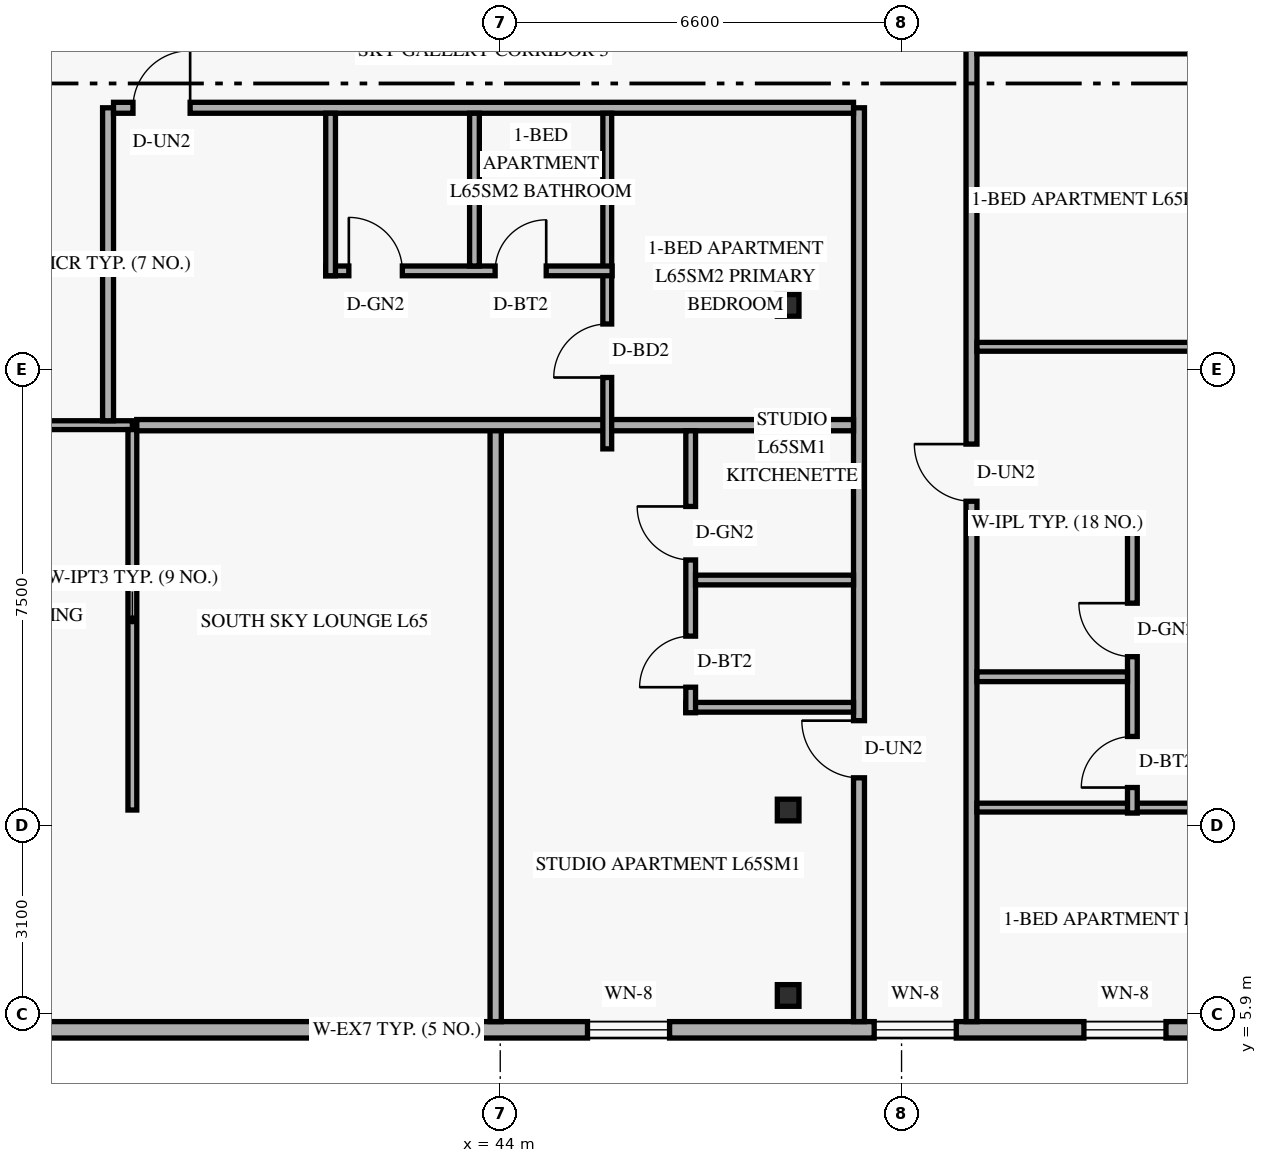
"""IFC4 building model, lengths in metres.
Left out: names, types, materials, properties, quantities, classifications, styles, units other than length and angle.
Written with IfcOpenShell. Run it as: python <this file> out.ifc"""

import sys

from ifc_helpers import new_model, si_unit, direction, frame, frame_2d, origin, origin_2d, place, context, subcontext, project, spatial, rectangle, hollow_rectangle, extrude, element, fill, save


model = new_model("IFC4")
c1 = context("Model", 3, precision=1e-05, world=origin(), true_north=direction((0.0, 1.0)))
c2 = subcontext(c1, "Body", "Model", "MODEL_VIEW")
j1 = project(units=[si_unit("LENGTHUNIT", "METRE"), si_unit("PLANEANGLEUNIT", "RADIAN")], contexts=[c1])
p1 = place(None, origin())
s1 = spatial("IfcSite", under=j1, at=p1, CompositionType="ELEMENT")
p2 = place(p1, origin())
s2 = spatial("IfcBuilding", under=s1, at=p2, CompositionType="ELEMENT")
p3 = place(p2, frame((0.0, 0.0, 249.6)))
s3 = spatial("IfcBuildingStorey", under=s2, at=p3, CompositionType="ELEMENT", Elevation=249.6)
for number, where, z_axis, x_axis in (
    (1, (48.672, 6.2, 0.0), (0.035, 0.0, 0.999), (0.0, 1.0, 0.0)),
    (2, (48.672, 9.25, 0.0), (0.035, 0.0, 0.999), (0.0, 1.0, 0.0)),
    (3, (48.672, 17.55, 0.0), (0.035, 0.0, 0.999), (0.0, 1.0, 0.0)),
):
    element("IfcColumn", number, at=place(p3, frame(where, z_axis=z_axis, x_axis=x_axis)), inside=s3, PredefinedType="COLUMN", context=c2, shape_type="SweptSolid", body=[
        extrude(hollow_rectangle(XDim=0.356, YDim=0.356, WallThickness=0.016, at=origin_2d()), origin(), (0.0, 0.0, 1.0), 3.602),
    ])
p4 = place(p3, frame((25.82, 5.635, 0.0), z_axis=(0.0, 0.0, 1.0), x_axis=(1.0, 0.0, 0.0)))
e4 = element("IfcWall", 4, at=p4, inside=s3, PredefinedType="SOLIDWALL", context=c2, shape_type="SweptSolid", body=[
    extrude(rectangle(XDim=32.96, YDim=0.27, at=frame_2d((16.48, 0.0))), origin(), (0.0, 0.0, 1.0), 3.36),
])
p5 = place(p4, frame((3.795, 0.0, 0.85)))
e5 = element("IfcOpeningElement", 5, at=p5, cuts=e4, PredefinedType="OPENING", context=c2, shape_type="SweptSolid", body=[
    extrude(rectangle(XDim=1.35, YDim=1.55, at=frame_2d((0.675, 0.775))), frame((0.0, 0.145, 0.0), z_axis=(0.0, -1.0, 0.0), x_axis=(1.0, 0.0, 0.0)), (0.0, 0.0, 1.0), 0.29),
])
p6 = place(p4, frame((19.615, 0.0, 0.85)))
e6 = element("IfcOpeningElement", 6, at=p6, cuts=e4, PredefinedType="OPENING", context=c2, shape_type="SweptSolid", body=[
    extrude(rectangle(XDim=1.35, YDim=1.55, at=frame_2d((0.675, 0.775))), frame((0.0, 0.145, 0.0), z_axis=(0.0, -1.0, 0.0), x_axis=(1.0, 0.0, 0.0)), (0.0, 0.0, 1.0), 0.29),
])
p7 = place(p4, frame((24.33, 0.0, 0.85)))
e7 = element("IfcOpeningElement", 7, at=p7, cuts=e4, PredefinedType="OPENING", context=c2, shape_type="SweptSolid", body=[
    extrude(rectangle(XDim=1.35, YDim=1.55, at=frame_2d((0.675, 0.775))), frame((0.0, 0.145, 0.0), z_axis=(0.0, -1.0, 0.0), x_axis=(1.0, 0.0, 0.0)), (0.0, 0.0, 1.0), 0.29),
])
p8 = place(p4, frame((27.779, 0.0, 0.85)))
e8 = element("IfcOpeningElement", 8, at=p8, cuts=e4, PredefinedType="OPENING", context=c2, shape_type="SweptSolid", body=[
    extrude(rectangle(XDim=1.35, YDim=1.55, at=frame_2d((0.675, 0.775))), frame((0.0, 0.145, 0.0), z_axis=(0.0, -1.0, 0.0), x_axis=(1.0, 0.0, 0.0)), (0.0, 0.0, 1.0), 0.29),
])
p9 = place(p3, frame((32.722, 15.58, 0.0), z_axis=(0.0, 0.0, 1.0), x_axis=(1.0, 0.0, 0.0)))
e9 = element("IfcWall", 9, at=p9, inside=s3, PredefinedType="PARTITIONING", context=c2, shape_type="SweptSolid", body=[
    extrude(rectangle(XDim=5.228, YDim=0.145, at=frame_2d((2.614, 0.0))), origin(), (0.0, 0.0, 1.0), 2.803),
])
p10 = place(p9, frame((2.877, 0.0, 0.0)))
e10 = element("IfcOpeningElement", 10, at=p10, cuts=e9, PredefinedType="OPENING", context=c2, shape_type="SweptSolid", body=[
    extrude(rectangle(XDim=0.95, YDim=2.15, at=frame_2d((0.475, 1.075))), frame((0.0, 0.083, 0.0), z_axis=(0.0, -1.0, 0.0), x_axis=(1.0, 0.0, 0.0)), (0.0, 0.0, 1.0), 0.165),
])
p11 = place(p3, frame((37.95, 9.25, 0.0), z_axis=(0.0, 0.0, 1.0), x_axis=(0.0, 1.0, 0.0)))
e11 = element("IfcWall", 11, at=p11, inside=s3, PredefinedType="PARTITIONING", context=c2, shape_type="SweptSolid", body=[
    extrude(rectangle(XDim=6.258, YDim=0.145, at=frame_2d((3.129, 0.0))), origin(), (0.0, 0.0, 1.0), 2.803),
])
p12 = place(p3, frame((37.55, 15.653, 0.0), z_axis=(0.0, 0.0, 1.0), x_axis=(0.0, 1.0, 0.0)))
e12 = element("IfcWall", 12, at=p12, inside=s3, PredefinedType="STANDARD", context=c2, shape_type="SweptSolid", body=[
    extrude(rectangle(XDim=5.147, YDim=0.18, at=frame_2d((2.574, 0.0))), origin(), (0.0, 0.0, 1.0), 2.803),
])
p13 = place(p3, frame((49.9, 5.77, 0.0), z_axis=(0.0, 0.0, 1.0), x_axis=(0.0, 1.0, 0.0)))
e13 = element("IfcWall", 13, at=p13, inside=s3, PredefinedType="STANDARD", context=c2, shape_type="SweptSolid", body=[
    extrude(rectangle(XDim=15.03, YDim=0.18, at=frame_2d((7.515, 0.0))), origin(), (0.0, 0.0, 1.0), 2.803),
])
p14 = place(p13, frame((4.01, 0.0, 0.0)))
e14 = element("IfcOpeningElement", 14, at=p14, cuts=e13, PredefinedType="OPENING", context=c2, shape_type="SweptSolid", body=[
    extrude(rectangle(XDim=0.94, YDim=2.15, at=frame_2d((0.47, 1.075))), frame((0.0, 0.1, 0.0), z_axis=(0.0, -1.0, 0.0), x_axis=(1.0, 0.0, 0.0)), (0.0, 0.0, 1.0), 0.2),
])
p15 = place(p3, frame((37.64, 20.8, 0.0), z_axis=(0.0, 0.0, 1.0), x_axis=(1.0, 0.0, 0.0)))
e15 = element("IfcWall", 15, at=p15, inside=s3, PredefinedType="STANDARD", context=c2, shape_type="SweptSolid", body=[
    extrude(rectangle(XDim=12.17, YDim=0.18, at=frame_2d((6.085, 0.0))), origin(), (0.0, 0.0, 1.0), 2.803),
])
p16 = place(p15, frame((0.32, 0.0, 0.0)))
e16 = element("IfcOpeningElement", 16, at=p16, cuts=e15, PredefinedType="OPENING", context=c2, shape_type="SweptSolid", body=[
    extrude(rectangle(XDim=0.94, YDim=2.15, at=frame_2d((0.47, 1.075))), frame((0.0, 0.1, 0.0), z_axis=(0.0, -1.0, 0.0), x_axis=(1.0, 0.0, 0.0)), (0.0, 0.0, 1.0), 0.2),
])
p17 = place(p3, frame((51.75, 5.77, 0.0), z_axis=(0.0, 0.0, 1.0), x_axis=(0.0, 1.0, 0.0)))
e17 = element("IfcWall", 17, at=p17, inside=s3, PredefinedType="STANDARD", context=c2, shape_type="SweptSolid", body=[
    extrude(rectangle(XDim=36.46, YDim=0.18, at=frame_2d((18.23, 0.0))), origin(), (0.0, 0.0, 1.0), 2.803),
])
p18 = place(p17, frame((8.559, 0.0, 0.0)))
e18 = element("IfcOpeningElement", 18, at=p18, cuts=e17, PredefinedType="OPENING", context=c2, shape_type="SweptSolid", body=[
    extrude(rectangle(XDim=0.94, YDim=2.15, at=frame_2d((0.47, 1.075))), frame((0.0, 0.1, 0.0), z_axis=(0.0, -1.0, 0.0), x_axis=(1.0, 0.0, 0.0)), (0.0, 0.0, 1.0), 0.2),
])
p19 = place(p17, frame((26.933, 0.0, 0.0)))
e19 = element("IfcOpeningElement", 19, at=p19, cuts=e17, PredefinedType="OPENING", context=c2, shape_type="SweptSolid", body=[
    extrude(rectangle(XDim=0.94, YDim=2.15, at=frame_2d((0.47, 1.075))), frame((0.0, 0.1, 0.0), z_axis=(0.0, -1.0, 0.0), x_axis=(1.0, 0.0, 0.0)), (0.0, 0.0, 1.0), 0.2),
])
p20 = place(p3, frame((51.84, 9.29, 0.0), z_axis=(0.0, 0.0, 1.0), x_axis=(1.0, 0.0, 0.0)))
e20 = element("IfcWall", 20, at=p20, inside=s3, PredefinedType="PARTITIONING", context=c2, shape_type="SweptSolid", body=[
    extrude(rectangle(XDim=10.29, YDim=0.145, at=frame_2d((5.145, 0.0))), origin(), (0.0, 0.0, 1.0), 2.803),
])
p21 = place(p20, frame((6.123, 0.0, 0.0)))
e21 = element("IfcOpeningElement", 21, at=p21, cuts=e20, PredefinedType="OPENING", context=c2, shape_type="SweptSolid", body=[
    extrude(rectangle(XDim=0.9, YDim=2.14, at=frame_2d((0.45, 1.07))), frame((0.0, 0.083, 0.0), z_axis=(0.0, -1.0, 0.0), x_axis=(1.0, 0.0, 0.0)), (0.0, 0.0, 1.0), 0.165),
])
p22 = place(p3, frame((51.84, 13.969, 0.0), z_axis=(0.0, 0.0, 1.0), x_axis=(1.0, 0.0, 0.0)))
e22 = element("IfcWall", 22, at=p22, inside=s3, PredefinedType="PLUMBINGWALL", context=c2, shape_type="SweptSolid", body=[
    extrude(rectangle(XDim=2.636, YDim=0.16, at=frame_2d((1.318, 0.0))), origin(), (0.0, 0.0, 1.0), 3.36),
])
p23 = place(p3, frame((54.396, 9.2, 0.0), z_axis=(0.0, 0.0, 1.0), x_axis=(0.0, 1.0, 0.0)))
e23 = element("IfcWall", 23, at=p23, inside=s3, PredefinedType="PLUMBINGWALL", context=c2, shape_type="SweptSolid", body=[
    extrude(rectangle(XDim=4.859, YDim=0.16, at=frame_2d((2.429, 0.0))), origin(), (0.0, 0.0, 1.0), 2.803),
])
p24 = place(p23, frame((0.42, 0.0, 0.0)))
e24 = element("IfcOpeningElement", 24, at=p24, cuts=e23, PredefinedType="OPENING", context=c2, shape_type="SweptSolid", body=[
    extrude(rectangle(XDim=0.84, YDim=2.12, at=frame_2d((0.42, 1.06))), frame((0.0, 0.09, 0.0), z_axis=(0.0, -1.0, 0.0), x_axis=(1.0, 0.0, 0.0)), (0.0, 0.0, 1.0), 0.18),
])
p25 = place(p23, frame((2.572, 0.0, 0.0)))
e25 = element("IfcOpeningElement", 25, at=p25, cuts=e23, PredefinedType="OPENING", context=c2, shape_type="SweptSolid", body=[
    extrude(rectangle(XDim=0.88, YDim=2.12, at=frame_2d((0.44, 1.06))), frame((0.0, 0.09, 0.0), z_axis=(0.0, -1.0, 0.0), x_axis=(1.0, 0.0, 0.0)), (0.0, 0.0, 1.0), 0.18),
])
p26 = place(p3, frame((51.84, 11.442, 0.0), z_axis=(0.0, 0.0, 1.0), x_axis=(1.0, 0.0, 0.0)))
e26 = element("IfcWall", 26, at=p26, inside=s3, PredefinedType="PLUMBINGWALL", context=c2, shape_type="SweptSolid", body=[
    extrude(rectangle(XDim=2.476, YDim=0.16, at=frame_2d((1.238, 0.0))), origin(), (0.0, 0.0, 1.0), 3.36),
])
p27 = place(p3, frame((51.84, 16.869, 0.0), z_axis=(0.0, 0.0, 1.0), x_axis=(1.0, 0.0, 0.0)))
e27 = element("IfcWall", 27, at=p27, inside=s3, PredefinedType="PARTITIONING", context=c2, shape_type="SweptSolid", body=[
    extrude(rectangle(XDim=10.29, YDim=0.145, at=frame_2d((5.145, 0.0))), origin(), (0.0, 0.0, 1.0), 2.879),
])
p28 = place(p27, frame((6.095, 0.0, 0.0)))
e28 = element("IfcOpeningElement", 28, at=p28, cuts=e27, PredefinedType="OPENING", context=c2, shape_type="SweptSolid", body=[
    extrude(rectangle(XDim=0.95, YDim=2.15, at=frame_2d((0.475, 1.075))), frame((0.0, 0.083, 0.0), z_axis=(0.0, -1.0, 0.0), x_axis=(1.0, 0.0, 0.0)), (0.0, 0.0, 1.0), 0.165),
])
p29 = place(p3, frame((51.84, 21.78, 0.0), z_axis=(0.0, 0.0, 1.0), x_axis=(1.0, 0.0, 0.0)))
e29 = element("IfcWall", 29, at=p29, inside=s3, PredefinedType="PARTITIONING", context=c2, shape_type="SweptSolid", body=[
    extrude(rectangle(XDim=10.29, YDim=0.185, at=frame_2d((5.145, 0.0))), origin(), (0.0, 0.0, 1.0), 2.879),
])
p30 = place(p3, frame((43.925, 5.77, 0.0), z_axis=(0.0, 0.0, 1.0), x_axis=(0.0, 1.0, 0.0)))
e30 = element("IfcWall", 30, at=p30, inside=s3, PredefinedType="PARTITIONING", context=c2, shape_type="SweptSolid", body=[
    extrude(rectangle(XDim=9.81, YDim=0.185, at=frame_2d((4.905, 0.0))), origin(), (0.0, 0.0, 1.0), 2.803),
])
p31 = place(p3, frame((38.022, 15.58, 0.0), z_axis=(0.0, 0.0, 1.0), x_axis=(1.0, 0.0, 0.0)))
e31 = element("IfcWall", 31, at=p31, inside=s3, PredefinedType="PARTITIONING", context=c2, shape_type="SweptSolid", body=[
    extrude(rectangle(XDim=11.788, YDim=0.185, at=frame_2d((5.894, 0.0))), origin(), (0.0, 0.0, 1.0), 2.803),
])
p32 = place(p3, frame((47.052, 10.94, 0.0), z_axis=(0.0, 0.0, 1.0), x_axis=(1.0, 0.0, 0.0)))
e32 = element("IfcWall", 32, at=p32, inside=s3, PredefinedType="PLUMBINGWALL", context=c2, shape_type="SweptSolid", body=[
    extrude(rectangle(XDim=2.758, YDim=0.16, at=frame_2d((1.379, 0.0))), origin(), (0.0, 0.0, 1.0), 2.803),
])
p33 = place(p3, frame((47.132, 10.85, 0.0), z_axis=(0.0, 0.0, 1.0), x_axis=(0.0, 1.0, 0.0)))
e33 = element("IfcWall", 33, at=p33, inside=s3, PredefinedType="PLUMBINGWALL", context=c2, shape_type="SweptSolid", body=[
    extrude(rectangle(XDim=4.637, YDim=0.16, at=frame_2d((2.319, 0.0))), origin(), (0.0, 0.0, 1.0), 3.039),
])
p34 = place(p33, frame((0.42, 0.0, 0.0)))
e34 = element("IfcOpeningElement", 34, at=p34, cuts=e33, PredefinedType="OPENING", context=c2, shape_type="SweptSolid", body=[
    extrude(rectangle(XDim=0.84, YDim=2.12, at=frame_2d((0.42, 1.06))), frame((0.0, 0.09, 0.0), z_axis=(0.0, -1.0, 0.0), x_axis=(1.0, 0.0, 0.0)), (0.0, 0.0, 1.0), 0.18),
])
p35 = place(p33, frame((2.513, 0.0, 0.0)))
e35 = element("IfcOpeningElement", 35, at=p35, cuts=e33, PredefinedType="OPENING", context=c2, shape_type="SweptSolid", body=[
    extrude(rectangle(XDim=0.88, YDim=2.12, at=frame_2d((0.44, 1.06))), frame((0.0, 0.09, 0.0), z_axis=(0.0, -1.0, 0.0), x_axis=(1.0, 0.0, 0.0)), (0.0, 0.0, 1.0), 0.18),
])
p36 = place(p3, frame((47.212, 13.033, 0.0), z_axis=(0.0, 0.0, 1.0), x_axis=(1.0, 0.0, 0.0)))
e36 = element("IfcWall", 36, at=p36, inside=s3, PredefinedType="PLUMBINGWALL", context=c2, shape_type="SweptSolid", body=[
    extrude(rectangle(XDim=2.598, YDim=0.16, at=frame_2d((1.299, 0.0))), origin(), (0.0, 0.0, 1.0), 2.803),
])
p37 = place(p3, frame((45.76, 15.19, 0.0), z_axis=(0.0, 0.0, 1.0), x_axis=(0.0, 1.0, 0.0)))
e37 = element("IfcWall", 37, at=p37, inside=s3, PredefinedType="PARTITIONING", context=c2, shape_type="SweptSolid", body=[
    extrude(rectangle(XDim=5.52, YDim=0.145, at=frame_2d((2.76, 0.0))), origin(), (0.0, 0.0, 1.0), 2.803),
])
p38 = place(p37, frame((1.174, 0.0, 0.0)))
e38 = element("IfcOpeningElement", 38, at=p38, cuts=e37, PredefinedType="OPENING", context=c2, shape_type="SweptSolid", body=[
    extrude(rectangle(XDim=0.88, YDim=2.14, at=frame_2d((0.44, 1.07))), frame((0.0, 0.083, 0.0), z_axis=(0.0, -1.0, 0.0), x_axis=(1.0, 0.0, 0.0)), (0.0, 0.0, 1.0), 0.165),
])
p39 = place(p3, frame((41.13, 18.117, 0.0), z_axis=(0.0, 0.0, 1.0), x_axis=(1.0, 0.0, 0.0)))
e39 = element("IfcWall", 39, at=p39, inside=s3, PredefinedType="PLUMBINGWALL", context=c2, shape_type="SweptSolid", body=[
    extrude(rectangle(XDim=4.71, YDim=0.16, at=frame_2d((2.355, 0.0))), origin(), (0.0, 0.0, 1.0), 3.36),
])
p40 = place(p39, frame((0.38, 0.0, 0.0)))
e40 = element("IfcOpeningElement", 40, at=p40, cuts=e39, PredefinedType="OPENING", context=c2, shape_type="SweptSolid", body=[
    extrude(rectangle(XDim=0.88, YDim=2.12, at=frame_2d((0.44, 1.06))), frame((0.0, 0.09, 0.0), z_axis=(0.0, -1.0, 0.0), x_axis=(1.0, 0.0, 0.0)), (0.0, 0.0, 1.0), 0.18),
])
p41 = place(p39, frame((2.786, 0.0, 0.0)))
e41 = element("IfcOpeningElement", 41, at=p41, cuts=e39, PredefinedType="OPENING", context=c2, shape_type="SweptSolid", body=[
    extrude(rectangle(XDim=0.84, YDim=2.12, at=frame_2d((0.42, 1.06))), frame((0.0, 0.09, 0.0), z_axis=(0.0, -1.0, 0.0), x_axis=(1.0, 0.0, 0.0)), (0.0, 0.0, 1.0), 0.18),
])
p42 = place(p3, frame((41.21, 18.038, 0.0), z_axis=(0.0, 0.0, 1.0), x_axis=(0.0, 1.0, 0.0)))
e42 = element("IfcWall", 42, at=p42, inside=s3, PredefinedType="PLUMBINGWALL", context=c2, shape_type="SweptSolid", body=[
    extrude(rectangle(XDim=2.672, YDim=0.16, at=frame_2d((1.336, 0.0))), origin(), (0.0, 0.0, 1.0), 3.36),
])
p43 = place(p3, frame((43.576, 18.198, 0.0), z_axis=(0.0, 0.0, 1.0), x_axis=(0.0, 1.0, 0.0)))
e43 = element("IfcWall", 43, at=p43, inside=s3, PredefinedType="PLUMBINGWALL", context=c2, shape_type="SweptSolid", body=[
    extrude(rectangle(XDim=2.512, YDim=0.16, at=frame_2d((1.256, 0.0))), origin(), (0.0, 0.0, 1.0), 3.36),
])
p44 = place(p6, origin())
e44 = element("IfcWindow", 44, at=p44, inside=s3, PartitioningType="SINGLE_PANEL", PredefinedType="WINDOW", context=c2, shape_type="SweptSolid", body=[
    extrude(rectangle(XDim=1.35, YDim=1.55, at=frame_2d((0.675, 0.775))), frame((0.0, 0.03, 0.0), z_axis=(0.0, -1.0, 0.0), x_axis=(1.0, 0.0, 0.0)), (0.0, 0.0, 1.0), 0.06),
])
fill(e6, e44)
p45 = place(p7, origin())
e45 = element("IfcWindow", 45, at=p45, inside=s3, PartitioningType="SINGLE_PANEL", PredefinedType="WINDOW", context=c2, shape_type="SweptSolid", body=[
    extrude(rectangle(XDim=1.35, YDim=1.55, at=frame_2d((0.675, 0.775))), frame((0.0, 0.03, 0.0), z_axis=(0.0, -1.0, 0.0), x_axis=(1.0, 0.0, 0.0)), (0.0, 0.0, 1.0), 0.06),
])
fill(e7, e45)
p46 = place(p8, origin())
e46 = element("IfcWindow", 46, at=p46, inside=s3, PartitioningType="SINGLE_PANEL", PredefinedType="WINDOW", context=c2, shape_type="SweptSolid", body=[
    extrude(rectangle(XDim=1.35, YDim=1.55, at=frame_2d((0.675, 0.775))), frame((0.0, 0.03, 0.0), z_axis=(0.0, -1.0, 0.0), x_axis=(1.0, 0.0, 0.0)), (0.0, 0.0, 1.0), 0.06),
])
fill(e8, e46)
p47 = place(p18, origin())
e47 = element("IfcDoor", 47, at=p47, inside=s3, OperationType="SINGLE_SWING_RIGHT", PredefinedType="DOOR", context=c2, shape_type="SweptSolid", body=[
    extrude(rectangle(XDim=0.94, YDim=2.15, at=frame_2d((0.47, 1.075))), frame((0.0, 0.025, 0.0), z_axis=(0.0, -1.0, 0.0), x_axis=(1.0, 0.0, 0.0)), (0.0, 0.0, 1.0), 0.05),
])
fill(e18, e47)
p48 = place(p24, origin())
e48 = element("IfcDoor", 48, at=p48, inside=s3, OperationType="SINGLE_SWING_LEFT", PredefinedType="DOOR", context=c2, shape_type="SweptSolid", body=[
    extrude(rectangle(XDim=0.84, YDim=2.12, at=frame_2d((0.42, 1.06))), frame((0.0, 0.025, 0.0), z_axis=(0.0, -1.0, 0.0), x_axis=(1.0, 0.0, 0.0)), (0.0, 0.0, 1.0), 0.05),
])
fill(e24, e48)
p49 = place(p25, origin())
e49 = element("IfcDoor", 49, at=p49, inside=s3, OperationType="SINGLE_SWING_RIGHT", PredefinedType="DOOR", context=c2, shape_type="SweptSolid", body=[
    extrude(rectangle(XDim=0.88, YDim=2.12, at=frame_2d((0.44, 1.06))), frame((0.0, 0.025, 0.0), z_axis=(0.0, -1.0, 0.0), x_axis=(1.0, 0.0, 0.0)), (0.0, 0.0, 1.0), 0.05),
])
fill(e25, e49)
p50 = place(p14, origin())
e50 = element("IfcDoor", 50, at=p50, inside=s3, OperationType="SINGLE_SWING_RIGHT", PredefinedType="DOOR", context=c2, shape_type="SweptSolid", body=[
    extrude(rectangle(XDim=0.94, YDim=2.15, at=frame_2d((0.47, 1.075))), frame((0.0, 0.025, 0.0), z_axis=(0.0, -1.0, 0.0), x_axis=(1.0, 0.0, 0.0)), (0.0, 0.0, 1.0), 0.05),
])
fill(e14, e50)
p51 = place(p34, origin())
e51 = element("IfcDoor", 51, at=p51, inside=s3, OperationType="SINGLE_SWING_LEFT", PredefinedType="DOOR", context=c2, shape_type="SweptSolid", body=[
    extrude(rectangle(XDim=0.84, YDim=2.12, at=frame_2d((0.42, 1.06))), frame((0.0, 0.025, 0.0), z_axis=(0.0, -1.0, 0.0), x_axis=(1.0, 0.0, 0.0)), (0.0, 0.0, 1.0), 0.05),
])
fill(e34, e51)
p52 = place(p35, origin())
e52 = element("IfcDoor", 52, at=p52, inside=s3, OperationType="SINGLE_SWING_RIGHT", PredefinedType="DOOR", context=c2, shape_type="SweptSolid", body=[
    extrude(rectangle(XDim=0.88, YDim=2.12, at=frame_2d((0.44, 1.06))), frame((0.0, 0.025, 0.0), z_axis=(0.0, -1.0, 0.0), x_axis=(1.0, 0.0, 0.0)), (0.0, 0.0, 1.0), 0.05),
])
fill(e35, e52)
p53 = place(p16, origin())
e53 = element("IfcDoor", 53, at=p53, inside=s3, OperationType="SINGLE_SWING_RIGHT", PredefinedType="DOOR", context=c2, shape_type="SweptSolid", body=[
    extrude(rectangle(XDim=0.94, YDim=2.15, at=frame_2d((0.47, 1.075))), frame((0.0, 0.025, 0.0), z_axis=(0.0, -1.0, 0.0), x_axis=(1.0, 0.0, 0.0)), (0.0, 0.0, 1.0), 0.05),
])
fill(e16, e53)
p54 = place(p40, origin())
e54 = element("IfcDoor", 54, at=p54, inside=s3, OperationType="SINGLE_SWING_LEFT", PredefinedType="DOOR", context=c2, shape_type="SweptSolid", body=[
    extrude(rectangle(XDim=0.88, YDim=2.12, at=frame_2d((0.44, 1.06))), frame((0.0, 0.025, 0.0), z_axis=(0.0, -1.0, 0.0), x_axis=(1.0, 0.0, 0.0)), (0.0, 0.0, 1.0), 0.05),
])
fill(e40, e54)
p55 = place(p41, origin())
e55 = element("IfcDoor", 55, at=p55, inside=s3, OperationType="SINGLE_SWING_RIGHT", PredefinedType="DOOR", context=c2, shape_type="SweptSolid", body=[
    extrude(rectangle(XDim=0.84, YDim=2.12, at=frame_2d((0.42, 1.06))), frame((0.0, 0.025, 0.0), z_axis=(0.0, -1.0, 0.0), x_axis=(1.0, 0.0, 0.0)), (0.0, 0.0, 1.0), 0.05),
])
fill(e41, e55)
p56 = place(p38, origin())
e56 = element("IfcDoor", 56, at=p56, inside=s3, OperationType="SINGLE_SWING_LEFT", PredefinedType="DOOR", context=c2, shape_type="SweptSolid", body=[
    extrude(rectangle(XDim=0.88, YDim=2.14, at=frame_2d((0.44, 1.07))), frame((0.0, 0.025, 0.0), z_axis=(0.0, -1.0, 0.0), x_axis=(1.0, 0.0, 0.0)), (0.0, 0.0, 1.0), 0.05),
])
fill(e38, e56)
save(model, sys.argv[1])
